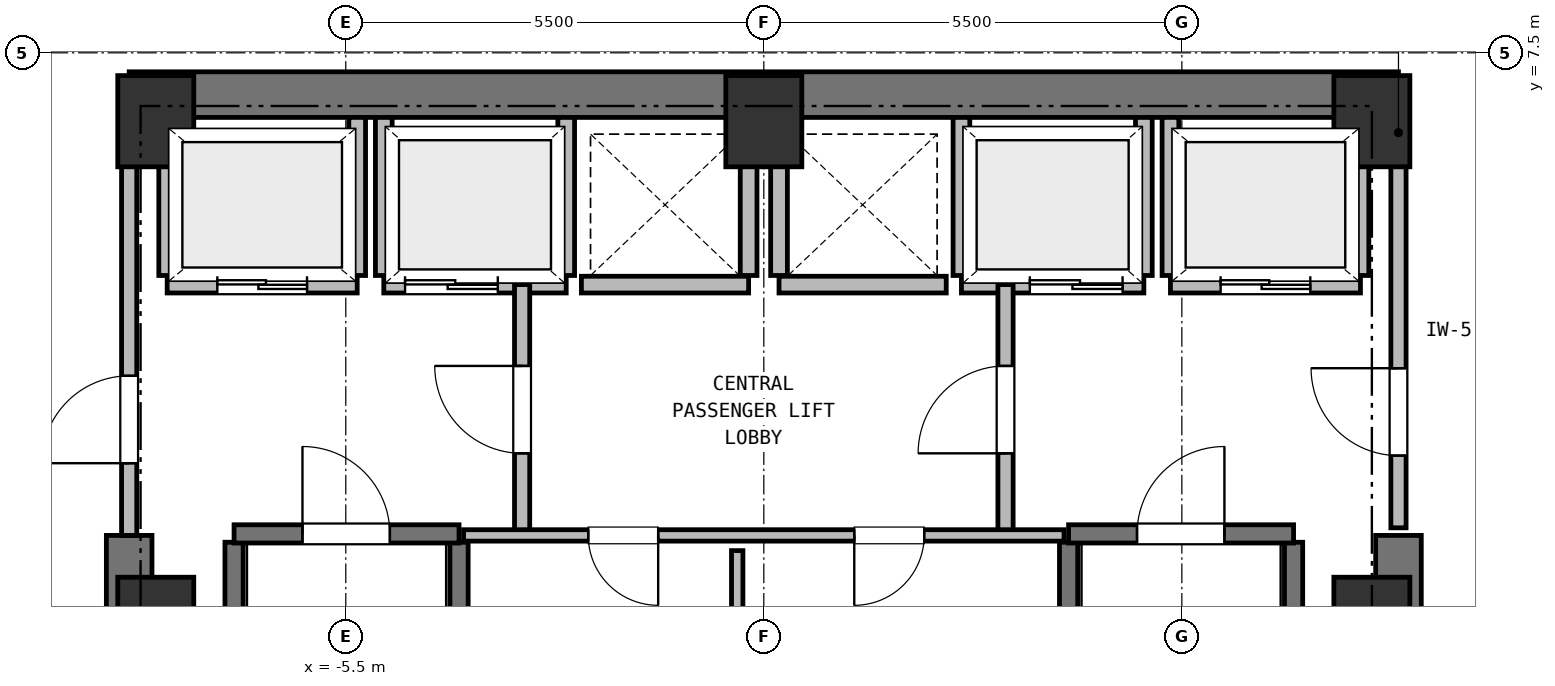
"""IFC4 building model, lengths in metres.
Left out: names, types, materials, properties, quantities, classifications, styles, units other than length and angle.
Written with IfcOpenShell. Run it as: python <this file> out.ifc"""

import sys

from ifc_helpers import new_model, si_unit, direction, frame, frame_2d, origin, origin_2d, place, context, subcontext, project, spatial, rectangle, extrude, element, fill, save


model = new_model("IFC4")
c1 = context("Model", 3, precision=1e-05, world=origin(), true_north=direction((0.0, 1.0)))
c2 = subcontext(c1, "Body", "Model", "MODEL_VIEW")
j1 = project(units=[si_unit("LENGTHUNIT", "METRE"), si_unit("PLANEANGLEUNIT", "RADIAN")], contexts=[c1])
p1 = place(None, origin())
s1 = spatial("IfcSite", under=j1, at=p1, CompositionType="ELEMENT")
p2 = place(p1, origin())
s2 = spatial("IfcBuilding", under=s1, at=p2, CompositionType="ELEMENT")
p3 = place(p2, frame((0.0, 0.0, 164.75)))
s3 = spatial("IfcBuildingStorey", under=s2, at=p3, CompositionType="ELEMENT", Elevation=164.75)
for number, where, z_axis, x_axis in (
    (1, (8.0, 0.0, 0.0), (0.0, 0.0, 1.0), (1.0, 0.0, 0.0)),
    (2, (8.0, 6.6, 0.0), (0.0, 0.0, 1.0), (1.0, 0.0, 0.0)),
    (3, (0.0, 6.6, 0.0), (0.0, 0.0, 1.0), (1.0, 0.0, 0.0)),
    (4, (-8.0, 6.6, 0.0), (0.0, 0.0, 1.0), (1.0, 0.0, 0.0)),
    (5, (-8.0, 0.0, 0.0), (0.0, 0.0, 1.0), (1.0, 0.0, 0.0)),
):
    element("IfcColumn", number, at=place(p3, frame(where, z_axis=z_axis, x_axis=x_axis)), inside=s3, PredefinedType="COLUMN", context=c2, shape_type="SweptSolid", body=[
        extrude(rectangle(XDim=1.0, YDim=1.2, at=origin_2d()), origin(), (0.0, 0.0, 1.0), 3.75),
    ])
p4 = place(p3, frame((-8.35, 6.95, 0.0), z_axis=(0.0, 0.0, 1.0), x_axis=(1.0, 0.0, 0.0)))
e6 = element("IfcWall", 6, at=p4, inside=s3, PredefinedType="SHEAR", context=c2, shape_type="SweptSolid", body=[
    extrude(rectangle(XDim=16.7, YDim=0.6, at=frame_2d((8.35, 0.0))), origin(), (0.0, 0.0, 1.0), 3.44),
])
for number, where, z_axis, x_axis in (
    (7, (-8.35, -6.95, 0.0), (0.0, 0.0, 1.0), (0.0, 1.0, 0.0)),
    (8, (8.35, -6.95, 0.0), (0.0, 0.0, 1.0), (0.0, 1.0, 0.0)),
):
    element("IfcWall", number, at=place(p3, frame(where, z_axis=z_axis, x_axis=x_axis)), inside=s3, PredefinedType="SHEAR", context=c2, shape_type="SweptSolid", body=[
        extrude(rectangle(XDim=8.1, YDim=0.6, at=frame_2d((4.05, 0.0))), origin(), (0.0, 0.0, 1.0), 3.44),
    ])
for number, where, z_axis, x_axis in (
    (9, (-6.97, -6.16, 0.0), (0.0, 0.0, 1.0), (0.0, 1.0, 0.0)),
    (10, (-4.01, -6.16, 0.0), (0.0, 0.0, 1.0), (0.0, 1.0, 0.0)),
):
    element("IfcWall", number, at=place(p3, frame(where, z_axis=z_axis, x_axis=x_axis)), inside=s3, PredefinedType="SHEAR", context=c2, shape_type="SweptSolid", body=[
        extrude(rectangle(XDim=7.22, YDim=0.24, at=frame_2d((3.61, 0.0))), origin(), (0.0, 0.0, 1.0), 3.44),
    ])
p5 = place(p3, frame((-6.97, 1.17, 0.0), z_axis=(0.0, 0.0, 1.0), x_axis=(1.0, 0.0, 0.0)))
e11 = element("IfcWall", 11, at=p5, inside=s3, PredefinedType="SHEAR", context=c2, shape_type="SweptSolid", body=[
    extrude(rectangle(XDim=2.96, YDim=0.24, at=frame_2d((1.48, 0.0))), origin(), (0.0, 0.0, 1.0), 3.44),
])
p6 = place(p5, frame((0.9, 0.0, 0.0)))
e12 = element("IfcOpeningElement", 12, at=p6, cuts=e11, PredefinedType="OPENING", context=c2, shape_type="SweptSolid", body=[
    extrude(rectangle(XDim=1.15, YDim=2.15, at=frame_2d((0.575, 1.075))), frame((0.0, 0.13, 0.0), z_axis=(0.0, -1.0, 0.0), x_axis=(1.0, 0.0, 0.0)), (0.0, 0.0, 1.0), 0.26),
])
for number, where, z_axis, x_axis in (
    (13, (4.01, -6.16, 0.0), (0.0, 0.0, 1.0), (0.0, 1.0, 0.0)),
    (14, (6.97, -6.16, 0.0), (0.0, 0.0, 1.0), (0.0, 1.0, 0.0)),
):
    element("IfcWall", number, at=place(p3, frame(where, z_axis=z_axis, x_axis=x_axis)), inside=s3, PredefinedType="SHEAR", context=c2, shape_type="SweptSolid", body=[
        extrude(rectangle(XDim=7.22, YDim=0.24, at=frame_2d((3.61, 0.0))), origin(), (0.0, 0.0, 1.0), 3.44),
    ])
p7 = place(p3, frame((4.01, 1.17, 0.0), z_axis=(0.0, 0.0, 1.0), x_axis=(1.0, 0.0, 0.0)))
e15 = element("IfcWall", 15, at=p7, inside=s3, PredefinedType="SHEAR", context=c2, shape_type="SweptSolid", body=[
    extrude(rectangle(XDim=2.96, YDim=0.24, at=frame_2d((1.48, 0.0))), origin(), (0.0, 0.0, 1.0), 3.44),
])
p8 = place(p7, frame((0.9, 0.0, 0.0)))
e16 = element("IfcOpeningElement", 16, at=p8, cuts=e15, PredefinedType="OPENING", context=c2, shape_type="SweptSolid", body=[
    extrude(rectangle(XDim=1.15, YDim=2.15, at=frame_2d((0.575, 1.075))), frame((0.0, 0.13, 0.0), z_axis=(0.0, -1.0, 0.0), x_axis=(1.0, 0.0, 0.0)), (0.0, 0.0, 1.0), 0.26),
])
p9 = place(p3, frame((-7.85, 4.45, 0.0), z_axis=(0.0, 0.0, 1.0), x_axis=(1.0, 0.0, 0.0)))
e17 = element("IfcWall", 17, at=p9, inside=s3, PredefinedType="PARTITIONING", context=c2, shape_type="SweptSolid", body=[
    extrude(rectangle(XDim=2.5, YDim=0.22, at=frame_2d((1.25, 0.0))), origin(), (0.0, 0.0, 1.0), 3.44),
])
p10 = place(p9, frame((0.66, 0.0, 0.0)))
e18 = element("IfcOpeningElement", 18, at=p10, cuts=e17, PredefinedType="OPENING", context=c2, shape_type="SweptSolid", body=[
    extrude(rectangle(XDim=1.18, YDim=2.15, at=frame_2d((0.59, 1.075))), frame((0.0, 0.12, 0.0), z_axis=(0.0, -1.0, 0.0), x_axis=(1.0, 0.0, 0.0)), (0.0, 0.0, 1.0), 0.24),
])
p11 = place(p3, frame((-7.85, 4.57, 0.0), z_axis=(0.0, 0.0, 1.0), x_axis=(0.0, 1.0, 0.0)))
e19 = element("IfcWall", 19, at=p11, inside=s3, PredefinedType="PARTITIONING", context=c2, shape_type="SweptSolid", body=[
    extrude(rectangle(XDim=2.08, YDim=0.22, at=frame_2d((1.04, 0.0))), origin(), (0.0, 0.0, 1.0), 3.06),
])
p12 = place(p3, frame((-5.35, 4.57, 0.0), z_axis=(0.0, 0.0, 1.0), x_axis=(0.0, 1.0, 0.0)))
e20 = element("IfcWall", 20, at=p12, inside=s3, PredefinedType="PARTITIONING", context=c2, shape_type="SweptSolid", body=[
    extrude(rectangle(XDim=2.08, YDim=0.22, at=frame_2d((1.04, 0.0))), origin(), (0.0, 0.0, 1.0), 3.44),
])
p13 = place(p3, frame((5.35, 4.45, 0.0), z_axis=(0.0, 0.0, 1.0), x_axis=(1.0, 0.0, 0.0)))
e21 = element("IfcWall", 21, at=p13, inside=s3, PredefinedType="PARTITIONING", context=c2, shape_type="SweptSolid", body=[
    extrude(rectangle(XDim=2.5, YDim=0.22, at=frame_2d((1.25, 0.0))), origin(), (0.0, 0.0, 1.0), 3.44),
])
p14 = place(p13, frame((0.66, 0.0, 0.0)))
e22 = element("IfcOpeningElement", 22, at=p14, cuts=e21, PredefinedType="OPENING", context=c2, shape_type="SweptSolid", body=[
    extrude(rectangle(XDim=1.18, YDim=2.15, at=frame_2d((0.59, 1.075))), frame((0.0, 0.12, 0.0), z_axis=(0.0, -1.0, 0.0), x_axis=(1.0, 0.0, 0.0)), (0.0, 0.0, 1.0), 0.24),
])
p15 = place(p3, frame((5.35, 4.57, 0.0), z_axis=(0.0, 0.0, 1.0), x_axis=(0.0, 1.0, 0.0)))
e23 = element("IfcWall", 23, at=p15, inside=s3, PredefinedType="PARTITIONING", context=c2, shape_type="SweptSolid", body=[
    extrude(rectangle(XDim=2.08, YDim=0.22, at=frame_2d((1.04, 0.0))), origin(), (0.0, 0.0, 1.0), 3.44),
])
p16 = place(p3, frame((7.85, 4.57, 0.0), z_axis=(0.0, 0.0, 1.0), x_axis=(0.0, 1.0, 0.0)))
e24 = element("IfcWall", 24, at=p16, inside=s3, PredefinedType="PARTITIONING", context=c2, shape_type="SweptSolid", body=[
    extrude(rectangle(XDim=2.08, YDim=0.22, at=frame_2d((1.04, 0.0))), origin(), (0.0, 0.0, 1.0), 3.06),
])
p17 = place(p3, frame((-5.0, 4.45, 0.0), z_axis=(0.0, 0.0, 1.0), x_axis=(1.0, 0.0, 0.0)))
e25 = element("IfcWall", 25, at=p17, inside=s3, PredefinedType="PARTITIONING", context=c2, shape_type="SweptSolid", body=[
    extrude(rectangle(XDim=2.4, YDim=0.22, at=frame_2d((1.2, 0.0))), origin(), (0.0, 0.0, 1.0), 3.44),
])
p18 = place(p17, frame((0.28, 0.0, 0.0)))
e26 = element("IfcOpeningElement", 26, at=p18, cuts=e25, PredefinedType="OPENING", context=c2, shape_type="SweptSolid", body=[
    extrude(rectangle(XDim=1.22, YDim=2.15, at=frame_2d((0.61, 1.075))), frame((0.0, 0.12, 0.0), z_axis=(0.0, -1.0, 0.0), x_axis=(1.0, 0.0, 0.0)), (0.0, 0.0, 1.0), 0.24),
])
for number, where, z_axis, x_axis in (
    (27, (-5.0, 4.57, 0.0), (0.0, 0.0, 1.0), (0.0, 1.0, 0.0)),
    (28, (-2.6, 4.57, 0.0), (0.0, 0.0, 1.0), (0.0, 1.0, 0.0)),
):
    element("IfcWall", number, at=place(p3, frame(where, z_axis=z_axis, x_axis=x_axis)), inside=s3, PredefinedType="PARTITIONING", context=c2, shape_type="SweptSolid", body=[
        extrude(rectangle(XDim=2.08, YDim=0.22, at=frame_2d((1.04, 0.0))), origin(), (0.0, 0.0, 1.0), 3.44),
    ])
p19 = place(p3, frame((2.6, 4.45, 0.0), z_axis=(0.0, 0.0, 1.0), x_axis=(1.0, 0.0, 0.0)))
e29 = element("IfcWall", 29, at=p19, inside=s3, PredefinedType="PARTITIONING", context=c2, shape_type="SweptSolid", body=[
    extrude(rectangle(XDim=2.4, YDim=0.22, at=frame_2d((1.2, 0.0))), origin(), (0.0, 0.0, 1.0), 3.44),
])
p20 = place(p19, frame((0.9, 0.0, 0.0)))
e30 = element("IfcOpeningElement", 30, at=p20, cuts=e29, PredefinedType="OPENING", context=c2, shape_type="SweptSolid", body=[
    extrude(rectangle(XDim=1.22, YDim=2.15, at=frame_2d((0.61, 1.075))), frame((0.0, 0.12, 0.0), z_axis=(0.0, -1.0, 0.0), x_axis=(1.0, 0.0, 0.0)), (0.0, 0.0, 1.0), 0.24),
])
for number, where, z_axis, x_axis in (
    (31, (2.6, 4.57, 0.0), (0.0, 0.0, 1.0), (0.0, 1.0, 0.0)),
    (32, (5.0, 4.57, 0.0), (0.0, 0.0, 1.0), (0.0, 1.0, 0.0)),
):
    element("IfcWall", number, at=place(p3, frame(where, z_axis=z_axis, x_axis=x_axis)), inside=s3, PredefinedType="PARTITIONING", context=c2, shape_type="SweptSolid", body=[
        extrude(rectangle(XDim=2.08, YDim=0.22, at=frame_2d((1.04, 0.0))), origin(), (0.0, 0.0, 1.0), 3.44),
    ])
p21 = place(p3, frame((-2.4, 4.45, 0.0), z_axis=(0.0, 0.0, 1.0), x_axis=(1.0, 0.0, 0.0)))
e33 = element("IfcWall", 33, at=p21, inside=s3, PredefinedType="PARTITIONING", context=c2, shape_type="SweptSolid", body=[
    extrude(rectangle(XDim=2.2, YDim=0.22, at=frame_2d((1.1, 0.0))), origin(), (0.0, 0.0, 1.0), 3.44),
])
p22 = place(p3, frame((-0.2, 4.57, 0.0), z_axis=(0.0, 0.0, 1.0), x_axis=(0.0, 1.0, 0.0)))
e34 = element("IfcWall", 34, at=p22, inside=s3, PredefinedType="PARTITIONING", context=c2, shape_type="SweptSolid", body=[
    extrude(rectangle(XDim=2.08, YDim=0.22, at=frame_2d((1.04, 0.0))), origin(), (0.0, 0.0, 1.0), 3.44),
])
p23 = place(p3, frame((0.2, 4.45, 0.0), z_axis=(0.0, 0.0, 1.0), x_axis=(1.0, 0.0, 0.0)))
e35 = element("IfcWall", 35, at=p23, inside=s3, PredefinedType="PARTITIONING", context=c2, shape_type="SweptSolid", body=[
    extrude(rectangle(XDim=2.2, YDim=0.22, at=frame_2d((1.1, 0.0))), origin(), (0.0, 0.0, 1.0), 3.44),
])
p24 = place(p3, frame((0.2, 4.57, 0.0), z_axis=(0.0, 0.0, 1.0), x_axis=(0.0, 1.0, 0.0)))
e36 = element("IfcWall", 36, at=p24, inside=s3, PredefinedType="PARTITIONING", context=c2, shape_type="SweptSolid", body=[
    extrude(rectangle(XDim=2.08, YDim=0.22, at=frame_2d((1.04, 0.0))), origin(), (0.0, 0.0, 1.0), 3.44),
])
p25 = place(p3, frame((-3.18, 1.15, 0.0), z_axis=(0.0, 0.0, 1.0), x_axis=(0.0, 1.0, 0.0)))
e37 = element("IfcWall", 37, at=p25, inside=s3, PredefinedType="PARTITIONING", context=c2, shape_type="SweptSolid", body=[
    extrude(rectangle(XDim=3.3, YDim=0.2, at=frame_2d((1.65, 0.0))), origin(), (0.0, 0.0, 1.0), 3.44),
])
p26 = place(p25, frame((1.08, 0.0, 0.0)))
e38 = element("IfcOpeningElement", 38, at=p26, cuts=e37, PredefinedType="OPENING", context=c2, shape_type="SweptSolid", body=[
    extrude(rectangle(XDim=1.15, YDim=2.15, at=frame_2d((0.575, 1.075))), frame((0.0, 0.11, 0.0), z_axis=(0.0, -1.0, 0.0), x_axis=(1.0, 0.0, 0.0)), (0.0, 0.0, 1.0), 0.22),
])
p27 = place(p3, frame((3.18, 1.15, 0.0), z_axis=(0.0, 0.0, 1.0), x_axis=(0.0, 1.0, 0.0)))
e39 = element("IfcWall", 39, at=p27, inside=s3, PredefinedType="PARTITIONING", context=c2, shape_type="SweptSolid", body=[
    extrude(rectangle(XDim=3.3, YDim=0.2, at=frame_2d((1.65, 0.0))), origin(), (0.0, 0.0, 1.0), 3.44),
])
p28 = place(p27, frame((1.08, 0.0, 0.0)))
e40 = element("IfcOpeningElement", 40, at=p28, cuts=e39, PredefinedType="OPENING", context=c2, shape_type="SweptSolid", body=[
    extrude(rectangle(XDim=1.15, YDim=2.15, at=frame_2d((0.575, 1.075))), frame((0.0, 0.11, 0.0), z_axis=(0.0, -1.0, 0.0), x_axis=(1.0, 0.0, 0.0)), (0.0, 0.0, 1.0), 0.22),
])
p29 = place(p3, frame((-8.35, 1.15, 0.0), z_axis=(0.0, 0.0, 1.0), x_axis=(0.0, 1.0, 0.0)))
e41 = element("IfcWall", 41, at=p29, inside=s3, PredefinedType="PARTITIONING", context=c2, shape_type="SweptSolid", body=[
    extrude(rectangle(XDim=5.4, YDim=0.2, at=frame_2d((2.7, 0.0))), origin(), (0.0, 0.0, 1.0), 3.44),
])
p30 = place(p29, frame((0.95, 0.0, 0.0)))
e42 = element("IfcOpeningElement", 42, at=p30, cuts=e41, PredefinedType="OPENING", context=c2, shape_type="SweptSolid", body=[
    extrude(rectangle(XDim=1.15, YDim=2.15, at=frame_2d((0.575, 1.075))), frame((0.0, 0.11, 0.0), z_axis=(0.0, -1.0, 0.0), x_axis=(1.0, 0.0, 0.0)), (0.0, 0.0, 1.0), 0.22),
])
p31 = place(p3, frame((8.35, 1.25, 0.0), z_axis=(0.0, 0.0, 1.0), x_axis=(0.0, 1.0, 0.0)))
e43 = element("IfcWall", 43, at=p31, inside=s3, PredefinedType="PARTITIONING", context=c2, shape_type="SweptSolid", body=[
    extrude(rectangle(XDim=5.3, YDim=0.2, at=frame_2d((2.65, 0.0))), origin(), (0.0, 0.0, 1.0), 3.44),
])
p32 = place(p31, frame((0.95, 0.0, 0.0)))
e44 = element("IfcOpeningElement", 44, at=p32, cuts=e43, PredefinedType="OPENING", context=c2, shape_type="SweptSolid", body=[
    extrude(rectangle(XDim=1.15, YDim=2.15, at=frame_2d((0.575, 1.075))), frame((0.0, 0.11, 0.0), z_axis=(0.0, -1.0, 0.0), x_axis=(1.0, 0.0, 0.0)), (0.0, 0.0, 1.0), 0.22),
])
p33 = place(p3, frame((3.95, 1.15, 0.0), z_axis=(0.0, 0.0, 1.0), x_axis=(-1.0, 0.0, 0.0)))
e45 = element("IfcWall", 45, at=p33, inside=s3, PredefinedType="PARTITIONING", context=c2, shape_type="SweptSolid", body=[
    extrude(rectangle(XDim=7.9, YDim=0.15, at=frame_2d((3.95, 0.0))), origin(), (0.0, 0.0, 1.0), 3.44),
])
p34 = place(p33, frame((5.34, 0.0, 0.0)))
e46 = element("IfcOpeningElement", 46, at=p34, cuts=e45, PredefinedType="OPENING", context=c2, shape_type="SweptSolid", body=[
    extrude(rectangle(XDim=0.92, YDim=2.05, at=frame_2d((0.46, 1.025))), frame((0.0, 0.085, 0.0), z_axis=(0.0, -1.0, 0.0), x_axis=(1.0, 0.0, 0.0)), (0.0, 0.0, 1.0), 0.17),
])
p35 = place(p33, frame((1.84, 0.0, 0.0)))
e47 = element("IfcOpeningElement", 47, at=p35, cuts=e45, PredefinedType="OPENING", context=c2, shape_type="SweptSolid", body=[
    extrude(rectangle(XDim=0.92, YDim=2.05, at=frame_2d((0.46, 1.025))), frame((0.0, 0.085, 0.0), z_axis=(0.0, -1.0, 0.0), x_axis=(1.0, 0.0, 0.0)), (0.0, 0.0, 1.0), 0.17),
])
p36 = place(p3, frame((-0.35, -1.73, 0.0), z_axis=(0.0, 0.0, 1.0), x_axis=(0.0, 1.0, 0.0)))
e48 = element("IfcWall", 48, at=p36, inside=s3, PredefinedType="PARTITIONING", context=c2, shape_type="SweptSolid", body=[
    extrude(rectangle(XDim=2.68, YDim=0.15, at=frame_2d((1.34, 0.0))), origin(), (0.0, 0.0, 1.0), 3.44),
])
for number, where, z_axis, x_axis in (
    (49, (8.678, 9.272, 0.0), (0.0, 0.0, 1.0), (0.707, -0.707, 0.0)),
    (50, (-10.722, 7.228, 0.0), (0.0, 0.0, 1.0), (0.707, 0.707, 0.0)),
):
    element("IfcWall", number, at=place(p3, frame(where, z_axis=z_axis, x_axis=x_axis)), inside=s3, PredefinedType="PARTITIONING", context=c2, shape_type="SweptSolid", body=[
        extrude(rectangle(XDim=2.89, YDim=0.15, at=frame_2d((1.445, 0.0))), origin(), (0.0, 0.0, 1.0), 3.44),
    ])
p37 = place(p6, origin())
e51 = element("IfcDoor", 51, at=p37, inside=s3, OperationType="SINGLE_SWING_LEFT", PredefinedType="DOOR", context=c2, shape_type="SweptSolid", body=[
    extrude(rectangle(XDim=1.15, YDim=2.15, at=frame_2d((0.575, 1.075))), frame((0.0, 0.025, 0.0), z_axis=(0.0, -1.0, 0.0), x_axis=(1.0, 0.0, 0.0)), (0.0, 0.0, 1.0), 0.05),
])
fill(e12, e51)
p38 = place(p8, origin())
e52 = element("IfcDoor", 52, at=p38, inside=s3, OperationType="SINGLE_SWING_RIGHT", PredefinedType="DOOR", context=c2, shape_type="SweptSolid", body=[
    extrude(rectangle(XDim=1.15, YDim=2.15, at=frame_2d((0.575, 1.075))), frame((0.0, 0.025, 0.0), z_axis=(0.0, -1.0, 0.0), x_axis=(1.0, 0.0, 0.0)), (0.0, 0.0, 1.0), 0.05),
])
fill(e16, e52)
p39 = place(p10, origin())
e53 = element("IfcDoor", 53, at=p39, inside=s3, OperationType="DOUBLE_DOOR_SLIDING", PredefinedType="DOOR", context=c2, shape_type="SweptSolid", body=[
    extrude(rectangle(XDim=1.18, YDim=2.15, at=frame_2d((0.59, 1.075))), frame((0.0, 0.025, 0.0), z_axis=(0.0, -1.0, 0.0), x_axis=(1.0, 0.0, 0.0)), (0.0, 0.0, 1.0), 0.05),
])
fill(e18, e53)
p40 = place(p14, origin())
e54 = element("IfcDoor", 54, at=p40, inside=s3, OperationType="DOUBLE_DOOR_SLIDING", PredefinedType="DOOR", context=c2, shape_type="SweptSolid", body=[
    extrude(rectangle(XDim=1.18, YDim=2.15, at=frame_2d((0.59, 1.075))), frame((0.0, 0.025, 0.0), z_axis=(0.0, -1.0, 0.0), x_axis=(1.0, 0.0, 0.0)), (0.0, 0.0, 1.0), 0.05),
])
fill(e22, e54)
p41 = place(p18, origin())
e55 = element("IfcDoor", 55, at=p41, inside=s3, OperationType="DOUBLE_DOOR_SLIDING", PredefinedType="DOOR", context=c2, shape_type="SweptSolid", body=[
    extrude(rectangle(XDim=1.22, YDim=2.15, at=frame_2d((0.61, 1.075))), frame((0.0, 0.025, 0.0), z_axis=(0.0, -1.0, 0.0), x_axis=(1.0, 0.0, 0.0)), (0.0, 0.0, 1.0), 0.05),
])
fill(e26, e55)
p42 = place(p20, origin())
e56 = element("IfcDoor", 56, at=p42, inside=s3, OperationType="DOUBLE_DOOR_SLIDING", PredefinedType="DOOR", context=c2, shape_type="SweptSolid", body=[
    extrude(rectangle(XDim=1.22, YDim=2.15, at=frame_2d((0.61, 1.075))), frame((0.0, 0.025, 0.0), z_axis=(0.0, -1.0, 0.0), x_axis=(1.0, 0.0, 0.0)), (0.0, 0.0, 1.0), 0.05),
])
fill(e30, e56)
p43 = place(p26, origin())
e57 = element("IfcDoor", 57, at=p43, inside=s3, OperationType="SINGLE_SWING_RIGHT", PredefinedType="DOOR", context=c2, shape_type="SweptSolid", body=[
    extrude(rectangle(XDim=1.15, YDim=2.15, at=frame_2d((0.575, 1.075))), frame((0.0, 0.025, 0.0), z_axis=(0.0, -1.0, 0.0), x_axis=(1.0, 0.0, 0.0)), (0.0, 0.0, 1.0), 0.05),
])
fill(e38, e57)
p44 = place(p28, origin())
e58 = element("IfcDoor", 58, at=p44, inside=s3, OperationType="SINGLE_SWING_LEFT", PredefinedType="DOOR", context=c2, shape_type="SweptSolid", body=[
    extrude(rectangle(XDim=1.15, YDim=2.15, at=frame_2d((0.575, 1.075))), frame((0.0, 0.025, 0.0), z_axis=(0.0, -1.0, 0.0), x_axis=(1.0, 0.0, 0.0)), (0.0, 0.0, 1.0), 0.05),
])
fill(e40, e58)
p45 = place(p30, origin())
e59 = element("IfcDoor", 59, at=p45, inside=s3, OperationType="SINGLE_SWING_LEFT", PredefinedType="DOOR", context=c2, shape_type="SweptSolid", body=[
    extrude(rectangle(XDim=1.15, YDim=2.15, at=frame_2d((0.575, 1.075))), frame((0.0, 0.025, 0.0), z_axis=(0.0, -1.0, 0.0), x_axis=(1.0, 0.0, 0.0)), (0.0, 0.0, 1.0), 0.05),
])
fill(e42, e59)
p46 = place(p32, origin())
e60 = element("IfcDoor", 60, at=p46, inside=s3, OperationType="SINGLE_SWING_RIGHT", PredefinedType="DOOR", context=c2, shape_type="SweptSolid", body=[
    extrude(rectangle(XDim=1.15, YDim=2.15, at=frame_2d((0.575, 1.075))), frame((0.0, 0.025, 0.0), z_axis=(0.0, -1.0, 0.0), x_axis=(1.0, 0.0, 0.0)), (0.0, 0.0, 1.0), 0.05),
])
fill(e44, e60)
p47 = place(p34, origin())
e61 = element("IfcDoor", 61, at=p47, inside=s3, OperationType="SINGLE_SWING_LEFT", PredefinedType="DOOR", context=c2, shape_type="SweptSolid", body=[
    extrude(rectangle(XDim=0.92, YDim=2.05, at=frame_2d((0.46, 1.025))), frame((0.0, 0.025, 0.0), z_axis=(0.0, -1.0, 0.0), x_axis=(1.0, 0.0, 0.0)), (0.0, 0.0, 1.0), 0.05),
])
fill(e46, e61)
p48 = place(p35, origin())
e62 = element("IfcDoor", 62, at=p48, inside=s3, OperationType="SINGLE_SWING_RIGHT", PredefinedType="DOOR", context=c2, shape_type="SweptSolid", body=[
    extrude(rectangle(XDim=0.92, YDim=2.05, at=frame_2d((0.46, 1.025))), frame((0.0, 0.025, 0.0), z_axis=(0.0, -1.0, 0.0), x_axis=(1.0, 0.0, 0.0)), (0.0, 0.0, 1.0), 0.05),
])
fill(e47, e62)
save(model, sys.argv[1])
